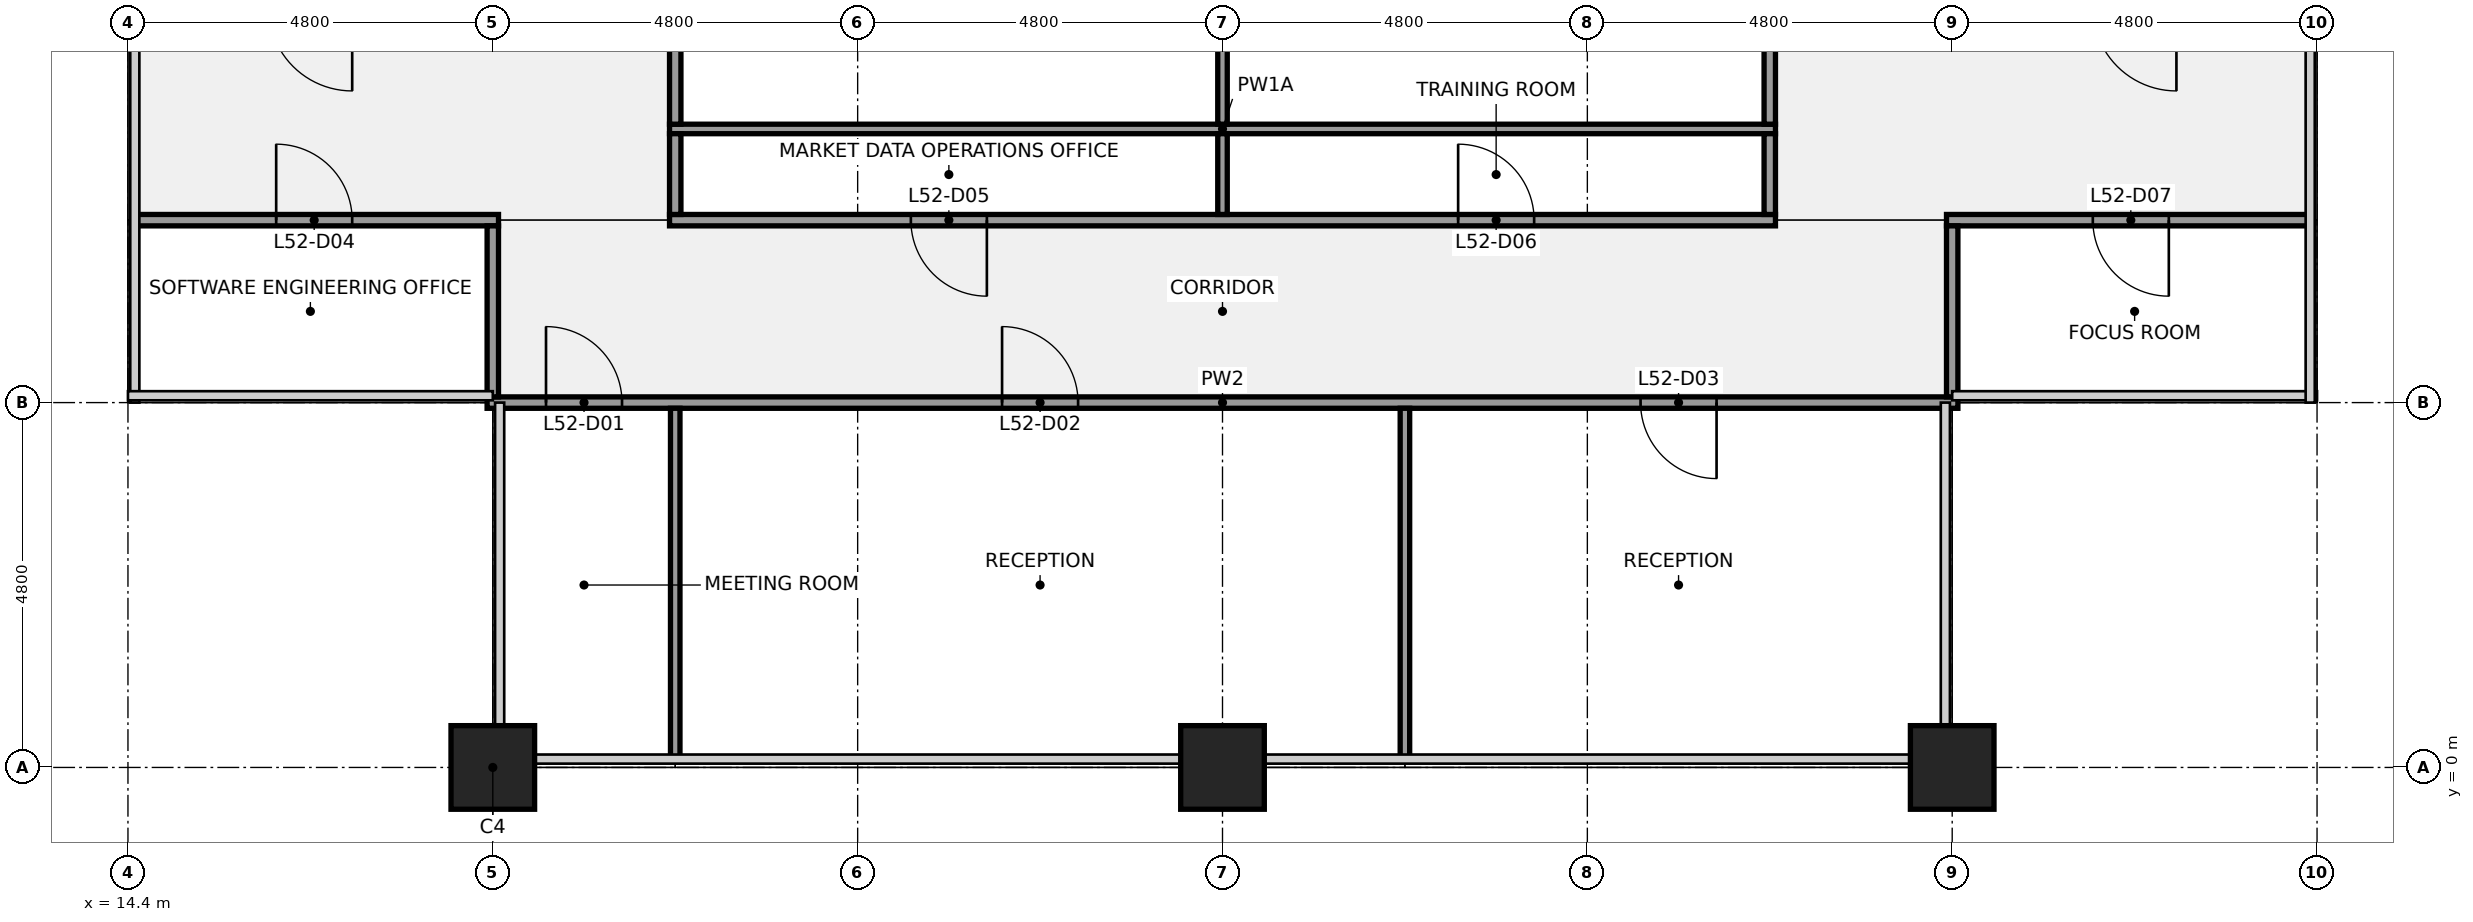
"""IFC4 building model, lengths in metres.
Left out: names, types, materials, properties, quantities, classifications, styles, units other than length and angle.
Written with IfcOpenShell. Run it as: python <this file> out.ifc"""

import sys

from ifc_helpers import new_model, si_unit, direction, frame, frame_2d, origin, origin_2d, place, context, subcontext, project, spatial, rectangle, extrude, element, fill, save


model = new_model("IFC4")
c1 = context("Model", 3, precision=1e-05, world=origin(), true_north=direction((0.0, 1.0)))
c2 = subcontext(c1, "Body", "Model", "MODEL_VIEW")
j1 = project(units=[si_unit("LENGTHUNIT", "METRE"), si_unit("PLANEANGLEUNIT", "RADIAN")], contexts=[c1])
p1 = place(None, origin())
s1 = spatial("IfcSite", under=j1, at=p1, CompositionType="ELEMENT")
p2 = place(p1, origin())
s2 = spatial("IfcBuilding", under=s1, at=p2, CompositionType="ELEMENT")
p3 = place(p2, frame((0.0, 0.0, 237.2)))
s3 = spatial("IfcBuildingStorey", under=s2, at=p3, CompositionType="ELEMENT", Elevation=237.2)
for number, where, z_axis, x_axis in (
    (1, (19.2, 0.0, 0.0), (0.0, 0.0, 1.0), (1.0, 0.0, 0.0)),
    (2, (28.8, 0.0, 0.0), (0.0, 0.0, 1.0), (1.0, 0.0, 0.0)),
    (3, (38.4, 0.0, 0.0), (0.0, 0.0, 1.0), (1.0, 0.0, 0.0)),
):
    element("IfcColumn", number, at=place(p3, frame(where, z_axis=z_axis, x_axis=x_axis)), inside=s3, PredefinedType="COLUMN", context=c2, shape_type="SweptSolid", body=[
        extrude(rectangle(XDim=1.1, YDim=1.1, at=origin_2d()), origin(), (0.0, 0.0, 1.0), 4.0),
    ])
p4 = place(p3, frame((19.125, 4.8, 0.0), z_axis=(0.0, 0.0, 1.0), x_axis=(1.0, 0.0, 0.0)))
e4 = element("IfcWall", 4, at=p4, inside=s3, PredefinedType="PARTITIONING", context=c2, shape_type="SweptSolid", body=[
    extrude(rectangle(XDim=19.35, YDim=0.15, at=frame_2d((9.675, 0.0))), origin(), (0.0, 0.0, 1.0), 2.87),
])
p5 = place(p4, frame((0.775, 0.0, 0.0)))
e5 = element("IfcOpeningElement", 5, at=p5, cuts=e4, PredefinedType="OPENING", context=c2, shape_type="SweptSolid", body=[
    extrude(rectangle(XDim=1.0, YDim=2.1, at=frame_2d((0.5, 1.05))), frame((0.0, 0.085, 0.0), z_axis=(0.0, -1.0, 0.0), x_axis=(1.0, 0.0, 0.0)), (0.0, 0.0, 1.0), 0.17),
])
p6 = place(p4, frame((6.775, 0.0, 0.0)))
e6 = element("IfcOpeningElement", 6, at=p6, cuts=e4, PredefinedType="OPENING", context=c2, shape_type="SweptSolid", body=[
    extrude(rectangle(XDim=1.0, YDim=2.1, at=frame_2d((0.5, 1.05))), frame((0.0, 0.085, 0.0), z_axis=(0.0, -1.0, 0.0), x_axis=(1.0, 0.0, 0.0)), (0.0, 0.0, 1.0), 0.17),
])
p7 = place(p4, frame((15.175, 0.0, 0.0)))
e7 = element("IfcOpeningElement", 7, at=p7, cuts=e4, PredefinedType="OPENING", context=c2, shape_type="SweptSolid", body=[
    extrude(rectangle(XDim=1.0, YDim=2.1, at=frame_2d((0.5, 1.05))), frame((0.0, 0.085, 0.0), z_axis=(0.0, -1.0, 0.0), x_axis=(1.0, 0.0, 0.0)), (0.0, 0.0, 1.0), 0.17),
])
p8 = place(p3, frame((14.5, 7.2, 0.0), z_axis=(0.0, 0.0, 1.0), x_axis=(1.0, 0.0, 0.0)))
e8 = element("IfcWall", 8, at=p8, inside=s3, PredefinedType="PARTITIONING", context=c2, shape_type="SweptSolid", body=[
    extrude(rectangle(XDim=4.775, YDim=0.15, at=frame_2d((2.387, 0.0))), origin(), (0.0, 0.0, 1.0), 2.87),
])
p9 = place(p8, frame((1.85, 0.0, 0.0)))
e9 = element("IfcOpeningElement", 9, at=p9, cuts=e8, PredefinedType="OPENING", context=c2, shape_type="SweptSolid", body=[
    extrude(rectangle(XDim=1.0, YDim=2.1, at=frame_2d((0.5, 1.05))), frame((0.0, 0.085, 0.0), z_axis=(0.0, -1.0, 0.0), x_axis=(1.0, 0.0, 0.0)), (0.0, 0.0, 1.0), 0.17),
])
p10 = place(p3, frame((21.525, 7.2, 0.0), z_axis=(0.0, 0.0, 1.0), x_axis=(1.0, 0.0, 0.0)))
e10 = element("IfcWall", 10, at=p10, inside=s3, PredefinedType="PARTITIONING", context=c2, shape_type="SweptSolid", body=[
    extrude(rectangle(XDim=14.55, YDim=0.15, at=frame_2d((7.275, 0.0))), origin(), (0.0, 0.0, 1.0), 2.87),
])
p11 = place(p10, frame((3.175, 0.0, 0.0)))
e11 = element("IfcOpeningElement", 11, at=p11, cuts=e10, PredefinedType="OPENING", context=c2, shape_type="SweptSolid", body=[
    extrude(rectangle(XDim=1.0, YDim=2.1, at=frame_2d((0.5, 1.05))), frame((0.0, 0.085, 0.0), z_axis=(0.0, -1.0, 0.0), x_axis=(1.0, 0.0, 0.0)), (0.0, 0.0, 1.0), 0.17),
])
p12 = place(p10, frame((10.375, 0.0, 0.0)))
e12 = element("IfcOpeningElement", 12, at=p12, cuts=e10, PredefinedType="OPENING", context=c2, shape_type="SweptSolid", body=[
    extrude(rectangle(XDim=1.0, YDim=2.1, at=frame_2d((0.5, 1.05))), frame((0.0, 0.085, 0.0), z_axis=(0.0, -1.0, 0.0), x_axis=(1.0, 0.0, 0.0)), (0.0, 0.0, 1.0), 0.17),
])
p13 = place(p3, frame((38.325, 7.2, 0.0), z_axis=(0.0, 0.0, 1.0), x_axis=(1.0, 0.0, 0.0)))
e13 = element("IfcWall", 13, at=p13, inside=s3, PredefinedType="PARTITIONING", context=c2, shape_type="SweptSolid", body=[
    extrude(rectangle(XDim=4.775, YDim=0.15, at=frame_2d((2.388, 0.0))), origin(), (0.0, 0.0, 1.0), 2.87),
])
p14 = place(p13, frame((1.925, 0.0, 0.0)))
e14 = element("IfcOpeningElement", 14, at=p14, cuts=e13, PredefinedType="OPENING", context=c2, shape_type="SweptSolid", body=[
    extrude(rectangle(XDim=1.0, YDim=2.1, at=frame_2d((0.5, 1.05))), frame((0.0, 0.085, 0.0), z_axis=(0.0, -1.0, 0.0), x_axis=(1.0, 0.0, 0.0)), (0.0, 0.0, 1.0), 0.17),
])
p15 = place(p3, frame((21.525, 8.4, 0.0), z_axis=(0.0, 0.0, 1.0), x_axis=(1.0, 0.0, 0.0)))
e15 = element("IfcWall", 15, at=p15, inside=s3, PredefinedType="PARTITIONING", context=c2, shape_type="SweptSolid", body=[
    extrude(rectangle(XDim=14.55, YDim=0.125, at=frame_2d((7.275, 0.0))), origin(), (0.0, 0.0, 1.0), 2.87),
])
p16 = place(p3, frame((19.2, 4.875, 0.0), z_axis=(0.0, 0.0, 1.0), x_axis=(0.0, 1.0, 0.0)))
e16 = element("IfcWall", 16, at=p16, inside=s3, PredefinedType="PARTITIONING", context=c2, shape_type="SweptSolid", body=[
    extrude(rectangle(XDim=2.25, YDim=0.15, at=frame_2d((1.125, 0.0))), origin(), (0.0, 0.0, 1.0), 2.87),
])
p17 = place(p3, frame((21.6, 0.1, 0.0), z_axis=(0.0, 0.0, 1.0), x_axis=(0.0, 1.0, 0.0)))
e17 = element("IfcWall", 17, at=p17, inside=s3, PredefinedType="PARTITIONING", context=c2, shape_type="SweptSolid", body=[
    extrude(rectangle(XDim=4.625, YDim=0.125, at=frame_2d((2.312, 0.0))), origin(), (0.0, 0.0, 1.0), 2.87),
])
p18 = place(p3, frame((21.6, 7.275, 0.0), z_axis=(0.0, 0.0, 1.0), x_axis=(0.0, 1.0, 0.0)))
e18 = element("IfcWall", 18, at=p18, inside=s3, PredefinedType="PARTITIONING", context=c2, shape_type="SweptSolid", body=[
    extrude(rectangle(XDim=1.062, YDim=0.15, at=frame_2d((0.531, 0.0))), origin(), (0.0, 0.0, 1.0), 2.87),
])
p19 = place(p3, frame((21.6, 8.462, 0.0), z_axis=(0.0, 0.0, 1.0), x_axis=(0.0, 1.0, 0.0)))
e19 = element("IfcWall", 19, at=p19, inside=s3, PredefinedType="PARTITIONING", context=c2, shape_type="SweptSolid", body=[
    extrude(rectangle(XDim=7.075, YDim=0.15, at=frame_2d((3.538, 0.0))), origin(), (0.0, 0.0, 1.0), 2.87),
])
p20 = place(p19, frame((3.038, 0.0, 0.0)))
e20 = element("IfcOpeningElement", 20, at=p20, cuts=e19, PredefinedType="OPENING", context=c2, shape_type="SweptSolid", body=[
    extrude(rectangle(XDim=1.0, YDim=2.1, at=frame_2d((0.5, 1.05))), frame((0.0, 0.085, 0.0), z_axis=(0.0, -1.0, 0.0), x_axis=(1.0, 0.0, 0.0)), (0.0, 0.0, 1.0), 0.17),
])
p21 = place(p3, frame((28.8, 7.275, 0.0), z_axis=(0.0, 0.0, 1.0), x_axis=(0.0, 1.0, 0.0)))
e21 = element("IfcWall", 21, at=p21, inside=s3, PredefinedType="PARTITIONING", context=c2, shape_type="SweptSolid", body=[
    extrude(rectangle(XDim=1.062, YDim=0.125, at=frame_2d((0.531, 0.0))), origin(), (0.0, 0.0, 1.0), 2.87),
])
p22 = place(p3, frame((28.8, 8.462, 0.0), z_axis=(0.0, 0.0, 1.0), x_axis=(0.0, 1.0, 0.0)))
e22 = element("IfcWall", 22, at=p22, inside=s3, PredefinedType="PARTITIONING", context=c2, shape_type="SweptSolid", body=[
    extrude(rectangle(XDim=7.075, YDim=0.125, at=frame_2d((3.538, 0.0))), origin(), (0.0, 0.0, 1.0), 2.87),
])
p23 = place(p3, frame((31.2, 0.1, 0.0), z_axis=(0.0, 0.0, 1.0), x_axis=(0.0, 1.0, 0.0)))
e23 = element("IfcWall", 23, at=p23, inside=s3, PredefinedType="PARTITIONING", context=c2, shape_type="SweptSolid", body=[
    extrude(rectangle(XDim=4.625, YDim=0.125, at=frame_2d((2.312, 0.0))), origin(), (0.0, 0.0, 1.0), 2.87),
])
p24 = place(p3, frame((36.0, 7.275, 0.0), z_axis=(0.0, 0.0, 1.0), x_axis=(0.0, 1.0, 0.0)))
e24 = element("IfcWall", 24, at=p24, inside=s3, PredefinedType="PARTITIONING", context=c2, shape_type="SweptSolid", body=[
    extrude(rectangle(XDim=1.062, YDim=0.15, at=frame_2d((0.531, 0.0))), origin(), (0.0, 0.0, 1.0), 2.87),
])
p25 = place(p3, frame((36.0, 8.462, 0.0), z_axis=(0.0, 0.0, 1.0), x_axis=(0.0, 1.0, 0.0)))
e25 = element("IfcWall", 25, at=p25, inside=s3, PredefinedType="PARTITIONING", context=c2, shape_type="SweptSolid", body=[
    extrude(rectangle(XDim=7.075, YDim=0.15, at=frame_2d((3.538, 0.0))), origin(), (0.0, 0.0, 1.0), 2.87),
])
p26 = place(p25, frame((3.038, 0.0, 0.0)))
e26 = element("IfcOpeningElement", 26, at=p26, cuts=e25, PredefinedType="OPENING", context=c2, shape_type="SweptSolid", body=[
    extrude(rectangle(XDim=1.0, YDim=2.1, at=frame_2d((0.5, 1.05))), frame((0.0, 0.085, 0.0), z_axis=(0.0, -1.0, 0.0), x_axis=(1.0, 0.0, 0.0)), (0.0, 0.0, 1.0), 0.17),
])
p27 = place(p3, frame((38.4, 4.875, 0.0), z_axis=(0.0, 0.0, 1.0), x_axis=(0.0, 1.0, 0.0)))
e27 = element("IfcWall", 27, at=p27, inside=s3, PredefinedType="PARTITIONING", context=c2, shape_type="SweptSolid", body=[
    extrude(rectangle(XDim=2.25, YDim=0.15, at=frame_2d((1.125, 0.0))), origin(), (0.0, 0.0, 1.0), 2.87),
])
for number, where, z_axis, x_axis in (
    (28, (19.2, -1.025, 0.0), (0.0, 0.0, 1.0), (1.0, 0.0, 0.0)),
    (29, (38.4, -1.025, 0.0), (0.0, 0.0, 1.0), (1.0, 0.0, 0.0)),
):
    element("IfcColumn", number, at=place(p3, frame(where, z_axis=z_axis, x_axis=x_axis)), inside=s3, PredefinedType="PILASTER", context=c2, shape_type="SweptSolid", body=[
        extrude(rectangle(XDim=2.4, YDim=0.95, at=origin_2d()), origin(), (0.0, 0.0, 1.0), 4.0),
    ])
p28 = place(p5, origin())
e30 = element("IfcDoor", 30, at=p28, inside=s3, OperationType="SINGLE_SWING_LEFT", PredefinedType="DOOR", context=c2, shape_type="SweptSolid", body=[
    extrude(rectangle(XDim=1.0, YDim=2.1, at=frame_2d((0.5, 1.05))), frame((0.0, 0.025, 0.0), z_axis=(0.0, -1.0, 0.0), x_axis=(1.0, 0.0, 0.0)), (0.0, 0.0, 1.0), 0.05),
])
fill(e5, e30)
p29 = place(p6, origin())
e31 = element("IfcDoor", 31, at=p29, inside=s3, OperationType="SINGLE_SWING_LEFT", PredefinedType="DOOR", context=c2, shape_type="SweptSolid", body=[
    extrude(rectangle(XDim=1.0, YDim=2.1, at=frame_2d((0.5, 1.05))), frame((0.0, 0.025, 0.0), z_axis=(0.0, -1.0, 0.0), x_axis=(1.0, 0.0, 0.0)), (0.0, 0.0, 1.0), 0.05),
])
fill(e6, e31)
p30 = place(p7, origin())
e32 = element("IfcDoor", 32, at=p30, inside=s3, OperationType="SINGLE_SWING_RIGHT", PredefinedType="DOOR", context=c2, shape_type="SweptSolid", body=[
    extrude(rectangle(XDim=1.0, YDim=2.1, at=frame_2d((0.5, 1.05))), frame((0.0, 0.025, 0.0), z_axis=(0.0, -1.0, 0.0), x_axis=(1.0, 0.0, 0.0)), (0.0, 0.0, 1.0), 0.05),
])
fill(e7, e32)
p31 = place(p9, origin())
e33 = element("IfcDoor", 33, at=p31, inside=s3, OperationType="SINGLE_SWING_LEFT", PredefinedType="DOOR", context=c2, shape_type="SweptSolid", body=[
    extrude(rectangle(XDim=1.0, YDim=2.1, at=frame_2d((0.5, 1.05))), frame((0.0, 0.025, 0.0), z_axis=(0.0, -1.0, 0.0), x_axis=(1.0, 0.0, 0.0)), (0.0, 0.0, 1.0), 0.05),
])
fill(e9, e33)
p32 = place(p11, origin())
e34 = element("IfcDoor", 34, at=p32, inside=s3, OperationType="SINGLE_SWING_RIGHT", PredefinedType="DOOR", context=c2, shape_type="SweptSolid", body=[
    extrude(rectangle(XDim=1.0, YDim=2.1, at=frame_2d((0.5, 1.05))), frame((0.0, 0.025, 0.0), z_axis=(0.0, -1.0, 0.0), x_axis=(1.0, 0.0, 0.0)), (0.0, 0.0, 1.0), 0.05),
])
fill(e11, e34)
p33 = place(p12, origin())
e35 = element("IfcDoor", 35, at=p33, inside=s3, OperationType="SINGLE_SWING_LEFT", PredefinedType="DOOR", context=c2, shape_type="SweptSolid", body=[
    extrude(rectangle(XDim=1.0, YDim=2.1, at=frame_2d((0.5, 1.05))), frame((0.0, 0.025, 0.0), z_axis=(0.0, -1.0, 0.0), x_axis=(1.0, 0.0, 0.0)), (0.0, 0.0, 1.0), 0.05),
])
fill(e12, e35)
p34 = place(p14, origin())
e36 = element("IfcDoor", 36, at=p34, inside=s3, OperationType="SINGLE_SWING_RIGHT", PredefinedType="DOOR", context=c2, shape_type="SweptSolid", body=[
    extrude(rectangle(XDim=1.0, YDim=2.1, at=frame_2d((0.5, 1.05))), frame((0.0, 0.025, 0.0), z_axis=(0.0, -1.0, 0.0), x_axis=(1.0, 0.0, 0.0)), (0.0, 0.0, 1.0), 0.05),
])
fill(e14, e36)
save(model, sys.argv[1])
